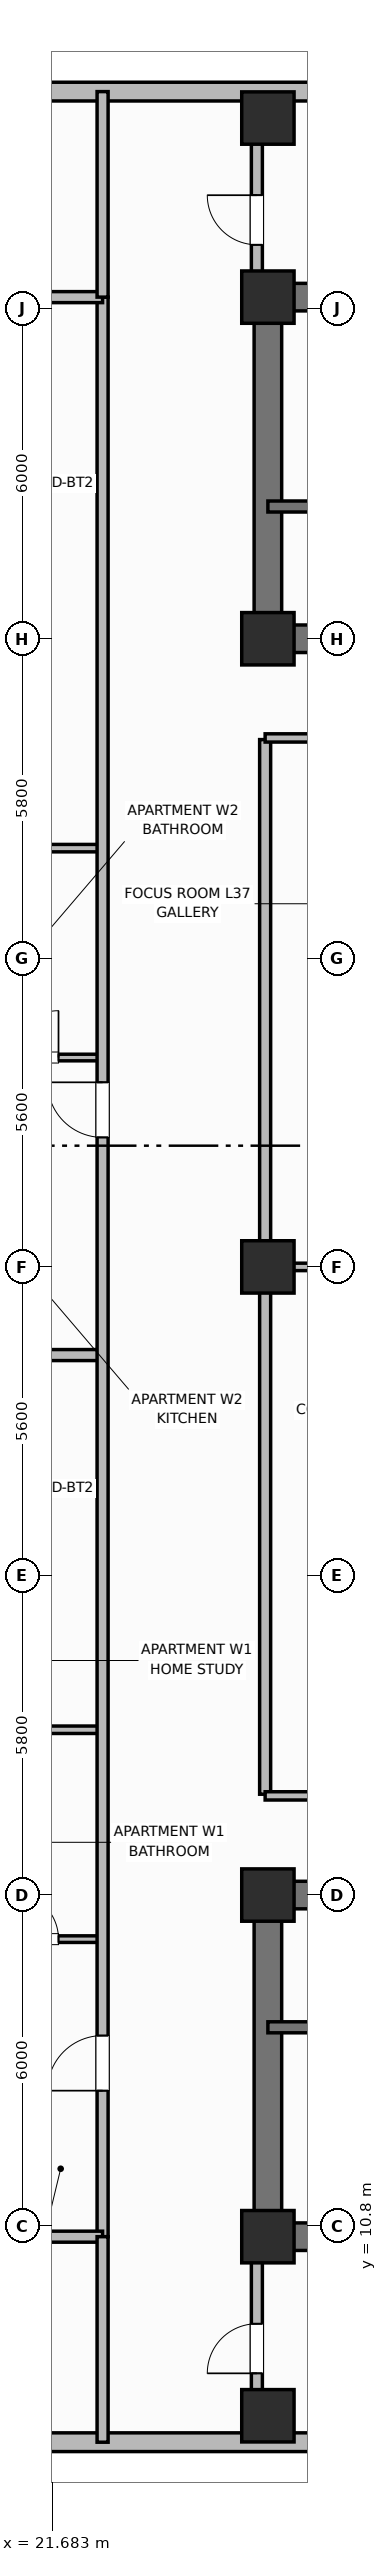
"""IFC4 building model, lengths in metres.
Left out: names, types, materials, properties, quantities, classifications, styles, units other than length and angle.
Written with IfcOpenShell. Run it as: python <this file> out.ifc"""

import sys

from ifc_helpers import new_model, si_unit, direction, frame, frame_2d, origin, origin_2d, place, context, subcontext, project, spatial, rectangle, extrude, element, fill, save


model = new_model("IFC4")
c1 = context("Model", 3, precision=1e-05, world=origin(), true_north=direction((0.0, 1.0)))
c2 = subcontext(c1, "Body", "Model", "MODEL_VIEW")
j1 = project(units=[si_unit("LENGTHUNIT", "METRE"), si_unit("PLANEANGLEUNIT", "RADIAN")], contexts=[c1])
p1 = place(None, origin())
s1 = spatial("IfcSite", under=j1, at=p1, CompositionType="ELEMENT")
p2 = place(p1, origin())
s2 = spatial("IfcBuilding", under=s1, at=p2, CompositionType="ELEMENT")
p3 = place(p2, frame((0.0, 0.0, 151.5)))
s3 = spatial("IfcBuildingStorey", under=s2, at=p3, CompositionType="ELEMENT", Elevation=151.5)
p4 = place(p3, frame((52.8, 10.6, 0.0), z_axis=(0.0, 0.0, 1.0), x_axis=(-1.0, 0.0, 0.0)))
e1 = element("IfcWall", 1, at=p4, inside=s3, PredefinedType="SHEAR", context=c2, shape_type="SweptSolid", body=[
    extrude(rectangle(XDim=27.2, YDim=0.5, at=frame_2d((13.6, 0.0))), origin(), (0.0, 0.0, 1.0), 3.7),
])
p5 = place(p3, frame((25.6, 10.85, 0.0), z_axis=(0.0, 0.0, 1.0), x_axis=(0.0, 1.0, 0.0)))
e2 = element("IfcWall", 2, at=p5, inside=s3, PredefinedType="SHEAR", context=c2, shape_type="SweptSolid", body=[
    extrude(rectangle(XDim=5.7, YDim=0.5, at=frame_2d((2.85, 0.0))), origin(), (0.0, 0.0, 1.0), 3.7),
])
p6 = place(p3, frame((25.6, 16.8, 0.0), z_axis=(0.0, 0.0, 1.0), x_axis=(1.0, 0.0, 0.0)))
e3 = element("IfcWall", 3, at=p6, inside=s3, PredefinedType="SHEAR", context=c2, shape_type="SweptSolid", body=[
    extrude(rectangle(XDim=27.2, YDim=0.5, at=frame_2d((13.6, 0.0))), origin(), (0.0, 0.0, 1.0), 3.7),
])
p7 = place(p6, frame((1.9, 0.0, 0.0)))
e4 = element("IfcOpeningElement", 4, at=p7, cuts=e3, PredefinedType="OPENING", context=c2, shape_type="SweptSolid", body=[
    extrude(rectangle(XDim=1.1, YDim=2.15, at=frame_2d((0.55, 1.075))), frame((0.0, 0.26, 0.0), z_axis=(0.0, -1.0, 0.0), x_axis=(1.0, 0.0, 0.0)), (0.0, 0.0, 1.0), 0.52),
])
p8 = place(p6, frame((13.0, 0.0, 0.0)))
e5 = element("IfcOpeningElement", 5, at=p8, cuts=e3, PredefinedType="OPENING", context=c2, shape_type="SweptSolid", body=[
    extrude(rectangle(XDim=1.2, YDim=2.15, at=frame_2d((0.6, 1.075))), frame((0.0, 0.26, 0.0), z_axis=(0.0, -1.0, 0.0), x_axis=(1.0, 0.0, 0.0)), (0.0, 0.0, 1.0), 0.52),
])
p9 = place(p6, frame((21.6, 0.0, 0.0)))
e6 = element("IfcOpeningElement", 6, at=p9, cuts=e3, PredefinedType="OPENING", context=c2, shape_type="SweptSolid", body=[
    extrude(rectangle(XDim=1.0, YDim=2.15, at=frame_2d((0.5, 1.075))), frame((0.0, 0.26, 0.0), z_axis=(0.0, -1.0, 0.0), x_axis=(1.0, 0.0, 0.0)), (0.0, 0.0, 1.0), 0.52),
])
p10 = place(p3, frame((25.6, 45.8, 0.0), z_axis=(0.0, 0.0, 1.0), x_axis=(1.0, 0.0, 0.0)))
e7 = element("IfcWall", 7, at=p10, inside=s3, PredefinedType="SHEAR", context=c2, shape_type="SweptSolid", body=[
    extrude(rectangle(XDim=27.2, YDim=0.5, at=frame_2d((13.6, 0.0))), origin(), (0.0, 0.0, 1.0), 3.7),
])
p11 = place(p3, frame((25.6, 39.85, 0.0), z_axis=(0.0, 0.0, 1.0), x_axis=(0.0, 1.0, 0.0)))
e8 = element("IfcWall", 8, at=p11, inside=s3, PredefinedType="SHEAR", context=c2, shape_type="SweptSolid", body=[
    extrude(rectangle(XDim=5.7, YDim=0.5, at=frame_2d((2.85, 0.0))), origin(), (0.0, 0.0, 1.0), 3.7),
])
p12 = place(p3, frame((52.8, 39.6, 0.0), z_axis=(0.0, 0.0, 1.0), x_axis=(-1.0, 0.0, 0.0)))
e9 = element("IfcWall", 9, at=p12, inside=s3, PredefinedType="SHEAR", context=c2, shape_type="SweptSolid", body=[
    extrude(rectangle(XDim=27.2, YDim=0.5, at=frame_2d((13.6, 0.0))), origin(), (0.0, 0.0, 1.0), 3.7),
])
p13 = place(p12, frame((24.2, 0.0, 0.0)))
e10 = element("IfcOpeningElement", 10, at=p13, cuts=e9, PredefinedType="OPENING", context=c2, shape_type="SweptSolid", body=[
    extrude(rectangle(XDim=1.1, YDim=2.15, at=frame_2d((0.55, 1.075))), frame((0.0, 0.26, 0.0), z_axis=(0.0, -1.0, 0.0), x_axis=(1.0, 0.0, 0.0)), (0.0, 0.0, 1.0), 0.52),
])
p14 = place(p12, frame((15.1, 0.0, 0.0)))
e11 = element("IfcOpeningElement", 11, at=p14, cuts=e9, PredefinedType="OPENING", context=c2, shape_type="SweptSolid", body=[
    extrude(rectangle(XDim=1.2, YDim=2.15, at=frame_2d((0.6, 1.075))), frame((0.0, 0.26, 0.0), z_axis=(0.0, -1.0, 0.0), x_axis=(1.0, 0.0, 0.0)), (0.0, 0.0, 1.0), 0.52),
])
p15 = place(p12, frame((11.6, 0.0, 0.0)))
e12 = element("IfcOpeningElement", 12, at=p15, cuts=e9, PredefinedType="OPENING", context=c2, shape_type="SweptSolid", body=[
    extrude(rectangle(XDim=0.9, YDim=2.1, at=frame_2d((0.45, 1.05))), frame((0.0, 0.26, 0.0), z_axis=(0.0, -1.0, 0.0), x_axis=(1.0, 0.0, 0.0)), (0.0, 0.0, 1.0), 0.52),
])
p16 = place(p12, frame((7.35, 0.0, 0.0)))
e13 = element("IfcOpeningElement", 13, at=p16, cuts=e9, PredefinedType="OPENING", context=c2, shape_type="SweptSolid", body=[
    extrude(rectangle(XDim=0.85, YDim=2.1, at=frame_2d((0.425, 1.05))), frame((0.0, 0.26, 0.0), z_axis=(0.0, -1.0, 0.0), x_axis=(1.0, 0.0, 0.0)), (0.0, 0.0, 1.0), 0.52),
])
p17 = place(p12, frame((3.6, 0.0, 0.0)))
e14 = element("IfcOpeningElement", 14, at=p17, cuts=e9, PredefinedType="OPENING", context=c2, shape_type="SweptSolid", body=[
    extrude(rectangle(XDim=1.0, YDim=2.15, at=frame_2d((0.5, 1.075))), frame((0.0, 0.26, 0.0), z_axis=(0.0, -1.0, 0.0), x_axis=(1.0, 0.0, 0.0)), (0.0, 0.0, 1.0), 0.52),
])
for number, where, z_axis, x_axis in (
    (15, (25.6, 10.6, 0.0), (0.0, 0.0, 1.0), (1.0, 0.0, 0.0)),
    (16, (25.6, 16.8, 0.0), (0.0, 0.0, 1.0), (1.0, 0.0, 0.0)),
    (17, (25.6, 39.6, 0.0), (0.0, 0.0, 1.0), (1.0, 0.0, 0.0)),
    (18, (25.6, 45.8, 0.0), (0.0, 0.0, 1.0), (1.0, 0.0, 0.0)),
    (19, (25.6, 28.2, 0.0), (0.0, 0.0, 1.0), (1.0, 0.0, 0.0)),
    (20, (25.6, 7.35, 0.0), (0.0, 0.0, 1.0), (1.0, 0.0, 0.0)),
    (21, (25.6, 49.05, 0.0), (0.0, 0.0, 1.0), (1.0, 0.0, 0.0)),
):
    element("IfcColumn", number, at=place(p3, frame(where, z_axis=z_axis, x_axis=x_axis)), inside=s3, PredefinedType="COLUMN", context=c2, shape_type="SweptSolid", body=[
        extrude(rectangle(XDim=0.95, YDim=0.95, at=origin_2d()), origin(), (0.0, 0.0, 1.0), 3.7),
    ])
p18 = place(p3, frame((20.2, 6.87, 0.0), z_axis=(0.0, 0.0, 1.0), x_axis=(1.0, 0.0, 0.0)))
e22 = element("IfcWall", 22, at=p18, inside=s3, PredefinedType="SOLIDWALL", context=c2, shape_type="SweptSolid", body=[
    extrude(rectangle(XDim=15.8, YDim=0.34, at=frame_2d((7.9, 0.0))), origin(), (0.0, 0.0, 1.0), 2.72),
])
p19 = place(p18, frame((7.2, 0.0, 0.75)))
e23 = element("IfcOpeningElement", 23, at=p19, cuts=e22, PredefinedType="OPENING", context=c2, shape_type="SweptSolid", body=[
    extrude(rectangle(XDim=1.4, YDim=1.85, at=frame_2d((0.7, 0.925))), frame((0.0, 0.18, 0.0), z_axis=(0.0, -1.0, 0.0), x_axis=(1.0, 0.0, 0.0)), (0.0, 0.0, 1.0), 0.36),
])
p20 = place(p18, frame((9.4, 0.0, 0.75)))
e24 = element("IfcOpeningElement", 24, at=p20, cuts=e22, PredefinedType="OPENING", context=c2, shape_type="SweptSolid", body=[
    extrude(rectangle(XDim=1.4, YDim=1.85, at=frame_2d((0.7, 0.925))), frame((0.0, 0.18, 0.0), z_axis=(0.0, -1.0, 0.0), x_axis=(1.0, 0.0, 0.0)), (0.0, 0.0, 1.0), 0.36),
])
p21 = place(p18, frame((12.3, 0.0, 0.75)))
e25 = element("IfcOpeningElement", 25, at=p21, cuts=e22, PredefinedType="OPENING", context=c2, shape_type="SweptSolid", body=[
    extrude(rectangle(XDim=1.4, YDim=1.85, at=frame_2d((0.7, 0.925))), frame((0.0, 0.18, 0.0), z_axis=(0.0, -1.0, 0.0), x_axis=(1.0, 0.0, 0.0)), (0.0, 0.0, 1.0), 0.36),
])
p22 = place(p3, frame((36.0, 49.53, 0.0), z_axis=(0.0, 0.0, 1.0), x_axis=(-1.0, 0.0, 0.0)))
e26 = element("IfcWall", 26, at=p22, inside=s3, PredefinedType="SOLIDWALL", context=c2, shape_type="SweptSolid", body=[
    extrude(rectangle(XDim=15.8, YDim=0.34, at=frame_2d((7.9, 0.0))), origin(), (0.0, 0.0, 1.0), 2.72),
])
p23 = place(p22, frame((5.188, 0.0, 0.75)))
e27 = element("IfcOpeningElement", 27, at=p23, cuts=e26, PredefinedType="OPENING", context=c2, shape_type="SweptSolid", body=[
    extrude(rectangle(XDim=1.8, YDim=1.85, at=frame_2d((0.9, 0.925))), frame((0.0, 0.18, 0.0), z_axis=(0.0, -1.0, 0.0), x_axis=(1.0, 0.0, 0.0)), (0.0, 0.0, 1.0), 0.36),
])
p24 = place(p3, frame((25.6, 14.4, 0.0), z_axis=(0.0, 0.0, 1.0), x_axis=(1.0, 0.0, 0.0)))
e28 = element("IfcWall", 28, at=p24, inside=s3, PredefinedType="SHEAR", context=c2, shape_type="SweptSolid", body=[
    extrude(rectangle(XDim=9.55, YDim=0.2, at=frame_2d((4.775, 0.0))), origin(), (0.0, 0.0, 1.0), 3.7),
])
p25 = place(p24, frame((1.05, 0.0, 0.0)))
e29 = element("IfcOpeningElement", 29, at=p25, cuts=e28, PredefinedType="OPENING", context=c2, shape_type="SweptSolid", body=[
    extrude(rectangle(XDim=1.1, YDim=2.15, at=frame_2d((0.55, 1.075))), frame((0.0, 0.11, 0.0), z_axis=(0.0, -1.0, 0.0), x_axis=(1.0, 0.0, 0.0)), (0.0, 0.0, 1.0), 0.22),
])
p26 = place(p3, frame((35.15, 42.0, 0.0), z_axis=(0.0, 0.0, 1.0), x_axis=(-1.0, 0.0, 0.0)))
e30 = element("IfcWall", 30, at=p26, inside=s3, PredefinedType="SHEAR", context=c2, shape_type="SweptSolid", body=[
    extrude(rectangle(XDim=9.55, YDim=0.2, at=frame_2d((4.775, 0.0))), origin(), (0.0, 0.0, 1.0), 3.7),
])
p27 = place(p26, frame((7.25, 0.0, 0.0)))
e31 = element("IfcOpeningElement", 31, at=p27, cuts=e30, PredefinedType="OPENING", context=c2, shape_type="SweptSolid", body=[
    extrude(rectangle(XDim=1.1, YDim=2.15, at=frame_2d((0.55, 1.075))), frame((0.0, 0.11, 0.0), z_axis=(0.0, -1.0, 0.0), x_axis=(1.0, 0.0, 0.0)), (0.0, 0.0, 1.0), 0.22),
])
p28 = place(p3, frame((25.55, 18.63, 0.0), z_axis=(0.0, 0.0, 1.0), x_axis=(0.0, 1.0, 0.0)))
e32 = element("IfcWall", 32, at=p28, inside=s3, PredefinedType="PARTITIONING", context=c2, shape_type="SweptSolid", body=[
    extrude(rectangle(XDim=19.14, YDim=0.2, at=frame_2d((9.57, 0.0))), origin(), (0.0, 0.0, 1.0), 2.55),
])
for number, where, z_axis, x_axis in (
    (33, (25.55, 18.6, 0.0), (0.0, 0.0, 1.0), (1.0, 0.0, 0.0)),
    (34, (25.55, 37.8, 0.0), (0.0, 0.0, 1.0), (1.0, 0.0, 0.0)),
):
    element("IfcWall", number, at=place(p3, frame(where, z_axis=z_axis, x_axis=x_axis)), inside=s3, PredefinedType="PARTITIONING", context=c2, shape_type="SweptSolid", body=[
        extrude(rectangle(XDim=2.7, YDim=0.15, at=frame_2d((1.35, 0.0))), origin(), (0.0, 0.0, 1.0), 2.55),
    ])
p29 = place(p3, frame((25.6, 28.2, 0.0), z_axis=(0.0, 0.0, 1.0), x_axis=(1.0, 0.0, 0.0)))
e35 = element("IfcWall", 35, at=p29, inside=s3, PredefinedType="PARTITIONING", context=c2, shape_type="SweptSolid", body=[
    extrude(rectangle(XDim=2.66, YDim=0.135, at=frame_2d((1.33, 0.0))), origin(), (0.0, 0.0, 1.0), 2.55),
])
p30 = place(p3, frame((20.35, 16.0, 0.0), z_axis=(0.0, 0.0, 1.0), x_axis=(1.0, 0.0, 0.0)))
e36 = element("IfcWall", 36, at=p30, inside=s3, PredefinedType="PARTITIONING", context=c2, shape_type="SweptSolid", body=[
    extrude(rectangle(XDim=2.25, YDim=0.12, at=frame_2d((1.125, 0.0))), origin(), (0.0, 0.0, 1.0), 2.55),
])
p31 = place(p30, frame((0.6, 0.0, 0.0)))
e37 = element("IfcOpeningElement", 37, at=p31, cuts=e36, PredefinedType="OPENING", context=c2, shape_type="SweptSolid", body=[
    extrude(rectangle(XDim=0.85, YDim=2.1, at=frame_2d((0.425, 1.05))), frame((0.0, 0.07, 0.0), z_axis=(0.0, -1.0, 0.0), x_axis=(1.0, 0.0, 0.0)), (0.0, 0.0, 1.0), 0.14),
])
p32 = place(p3, frame((20.35, 19.8, 0.0), z_axis=(0.0, 0.0, 1.0), x_axis=(1.0, 0.0, 0.0)))
e38 = element("IfcWall", 38, at=p32, inside=s3, PredefinedType="PARTITIONING", context=c2, shape_type="SweptSolid", body=[
    extrude(rectangle(XDim=2.25, YDim=0.135, at=frame_2d((1.125, 0.0))), origin(), (0.0, 0.0, 1.0), 2.55),
])
p33 = place(p3, frame((16.884, 26.6, 0.0), z_axis=(0.0, 0.0, 1.0), x_axis=(1.0, 0.0, 0.0)))
e39 = element("IfcWall", 39, at=p33, inside=s3, PredefinedType="PARTITIONING", context=c2, shape_type="SweptSolid", body=[
    extrude(rectangle(XDim=5.716, YDim=0.2, at=frame_2d((2.858, 0.0))), origin(), (0.0, 0.0, 1.0), 2.55),
])
p34 = place(p3, frame((20.35, 32.0, 0.0), z_axis=(0.0, 0.0, 1.0), x_axis=(1.0, 0.0, 0.0)))
e40 = element("IfcWall", 40, at=p34, inside=s3, PredefinedType="PARTITIONING", context=c2, shape_type="SweptSolid", body=[
    extrude(rectangle(XDim=2.25, YDim=0.12, at=frame_2d((1.125, 0.0))), origin(), (0.0, 0.0, 1.0), 2.55),
])
p35 = place(p34, frame((0.6, 0.0, 0.0)))
e41 = element("IfcOpeningElement", 41, at=p35, cuts=e40, PredefinedType="OPENING", context=c2, shape_type="SweptSolid", body=[
    extrude(rectangle(XDim=0.85, YDim=2.1, at=frame_2d((0.425, 1.05))), frame((0.0, 0.07, 0.0), z_axis=(0.0, -1.0, 0.0), x_axis=(1.0, 0.0, 0.0)), (0.0, 0.0, 1.0), 0.14),
])
p36 = place(p3, frame((20.35, 35.8, 0.0), z_axis=(0.0, 0.0, 1.0), x_axis=(1.0, 0.0, 0.0)))
e42 = element("IfcWall", 42, at=p36, inside=s3, PredefinedType="PARTITIONING", context=c2, shape_type="SweptSolid", body=[
    extrude(rectangle(XDim=2.25, YDim=0.135, at=frame_2d((1.125, 0.0))), origin(), (0.0, 0.0, 1.0), 2.55),
])
p37 = place(p3, frame((22.6, 10.6, 0.0), z_axis=(0.0, 0.0, 1.0), x_axis=(0.0, 1.0, 0.0)))
e43 = element("IfcWall", 43, at=p37, inside=s3, PredefinedType="PARTITIONING", context=c2, shape_type="SweptSolid", body=[
    extrude(rectangle(XDim=35.2, YDim=0.2, at=frame_2d((17.6, 0.0))), origin(), (0.0, 0.0, 1.0), 2.55),
])
p38 = place(p37, frame((2.65, 0.0, 0.0)))
e44 = element("IfcOpeningElement", 44, at=p38, cuts=e43, PredefinedType="OPENING", context=c2, shape_type="SweptSolid", body=[
    extrude(rectangle(XDim=1.0, YDim=2.15, at=frame_2d((0.5, 1.075))), frame((0.0, 0.11, 0.0), z_axis=(0.0, -1.0, 0.0), x_axis=(1.0, 0.0, 0.0)), (0.0, 0.0, 1.0), 0.22),
])
p39 = place(p37, frame((19.95, 0.0, 0.0)))
e45 = element("IfcOpeningElement", 45, at=p39, cuts=e43, PredefinedType="OPENING", context=c2, shape_type="SweptSolid", body=[
    extrude(rectangle(XDim=1.0, YDim=2.15, at=frame_2d((0.5, 1.075))), frame((0.0, 0.11, 0.0), z_axis=(0.0, -1.0, 0.0), x_axis=(1.0, 0.0, 0.0)), (0.0, 0.0, 1.0), 0.22),
])
for number, where, z_axis, x_axis in (
    (46, (16.99, 10.6, 0.0), (0.0, 0.0, 1.0), (1.0, 0.0, 0.0)),
    (47, (16.99, 45.8, 0.0), (0.0, 0.0, 1.0), (1.0, 0.0, 0.0)),
):
    element("IfcWall", number, at=place(p3, frame(where, z_axis=z_axis, x_axis=x_axis)), inside=s3, PredefinedType="PARTITIONING", context=c2, shape_type="SweptSolid", body=[
        extrude(rectangle(XDim=5.61, YDim=0.2, at=frame_2d((2.805, 0.0))), origin(), (0.0, 0.0, 1.0), 2.55),
    ])
for number, where, z_axis, x_axis in (
    (48, (22.6, 6.87, 0.0), (0.0, 0.0, 1.0), (0.0, 1.0, 0.0)),
    (49, (22.6, 45.8, 0.0), (0.0, 0.0, 1.0), (0.0, 1.0, 0.0)),
):
    element("IfcWall", number, at=place(p3, frame(where, z_axis=z_axis, x_axis=x_axis)), inside=s3, PredefinedType="PARTITIONING", context=c2, shape_type="SweptSolid", body=[
        extrude(rectangle(XDim=3.73, YDim=0.2, at=frame_2d((1.865, 0.0))), origin(), (0.0, 0.0, 1.0), 2.55),
    ])
p40 = place(p3, frame((25.4, 7.47, 0.0), z_axis=(0.0, 0.0, 1.0), x_axis=(0.0, 1.0, 0.0)))
e50 = element("IfcWall", 50, at=p40, inside=s3, PredefinedType="PARTITIONING", context=c2, shape_type="SweptSolid", body=[
    extrude(rectangle(XDim=2.83, YDim=0.2, at=frame_2d((1.415, 0.0))), origin(), (0.0, 0.0, 1.0), 2.55),
])
p41 = place(p40, frame((0.65, 0.0, 0.0)))
e51 = element("IfcOpeningElement", 51, at=p41, cuts=e50, PredefinedType="OPENING", context=c2, shape_type="SweptSolid", body=[
    extrude(rectangle(XDim=0.9, YDim=2.1, at=frame_2d((0.45, 1.05))), frame((0.0, 0.11, 0.0), z_axis=(0.0, -1.0, 0.0), x_axis=(1.0, 0.0, 0.0)), (0.0, 0.0, 1.0), 0.22),
])
p42 = place(p3, frame((25.4, 46.1, 0.0), z_axis=(0.0, 0.0, 1.0), x_axis=(0.0, 1.0, 0.0)))
e52 = element("IfcWall", 52, at=p42, inside=s3, PredefinedType="PARTITIONING", context=c2, shape_type="SweptSolid", body=[
    extrude(rectangle(XDim=2.83, YDim=0.2, at=frame_2d((1.415, 0.0))), origin(), (0.0, 0.0, 1.0), 2.55),
])
p43 = place(p42, frame((0.65, 0.0, 0.0)))
e53 = element("IfcOpeningElement", 53, at=p43, cuts=e52, PredefinedType="OPENING", context=c2, shape_type="SweptSolid", body=[
    extrude(rectangle(XDim=0.9, YDim=2.1, at=frame_2d((0.45, 1.05))), frame((0.0, 0.11, 0.0), z_axis=(0.0, -1.0, 0.0), x_axis=(1.0, 0.0, 0.0)), (0.0, 0.0, 1.0), 0.22),
])
p44 = place(p31, origin())
e54 = element("IfcDoor", 54, at=p44, inside=s3, OperationType="SINGLE_SWING_LEFT", PredefinedType="DOOR", context=c2, shape_type="SweptSolid", body=[
    extrude(rectangle(XDim=0.85, YDim=2.1, at=frame_2d((0.425, 1.05))), frame((0.0, 0.025, 0.0), z_axis=(0.0, -1.0, 0.0), x_axis=(1.0, 0.0, 0.0)), (0.0, 0.0, 1.0), 0.05),
])
fill(e37, e54)
p45 = place(p35, origin())
e55 = element("IfcDoor", 55, at=p45, inside=s3, OperationType="SINGLE_SWING_RIGHT", PredefinedType="DOOR", context=c2, shape_type="SweptSolid", body=[
    extrude(rectangle(XDim=0.85, YDim=2.1, at=frame_2d((0.425, 1.05))), frame((0.0, 0.025, 0.0), z_axis=(0.0, -1.0, 0.0), x_axis=(1.0, 0.0, 0.0)), (0.0, 0.0, 1.0), 0.05),
])
fill(e41, e55)
p46 = place(p38, origin())
e56 = element("IfcDoor", 56, at=p46, inside=s3, OperationType="SINGLE_SWING_LEFT", PredefinedType="DOOR", context=c2, shape_type="SweptSolid", body=[
    extrude(rectangle(XDim=1.0, YDim=2.15, at=frame_2d((0.5, 1.075))), frame((0.0, 0.025, 0.0), z_axis=(0.0, -1.0, 0.0), x_axis=(1.0, 0.0, 0.0)), (0.0, 0.0, 1.0), 0.05),
])
fill(e44, e56)
p47 = place(p39, origin())
e57 = element("IfcDoor", 57, at=p47, inside=s3, OperationType="SINGLE_SWING_RIGHT", PredefinedType="DOOR", context=c2, shape_type="SweptSolid", body=[
    extrude(rectangle(XDim=1.0, YDim=2.15, at=frame_2d((0.5, 1.075))), frame((0.0, 0.025, 0.0), z_axis=(0.0, -1.0, 0.0), x_axis=(1.0, 0.0, 0.0)), (0.0, 0.0, 1.0), 0.05),
])
fill(e45, e57)
p48 = place(p41, origin())
e58 = element("IfcDoor", 58, at=p48, inside=s3, OperationType="SINGLE_SWING_LEFT", PredefinedType="DOOR", context=c2, shape_type="SweptSolid", body=[
    extrude(rectangle(XDim=0.9, YDim=2.1, at=frame_2d((0.45, 1.05))), frame((0.0, 0.025, 0.0), z_axis=(0.0, -1.0, 0.0), x_axis=(1.0, 0.0, 0.0)), (0.0, 0.0, 1.0), 0.05),
])
fill(e51, e58)
p49 = place(p43, origin())
e59 = element("IfcDoor", 59, at=p49, inside=s3, OperationType="SINGLE_SWING_RIGHT", PredefinedType="DOOR", context=c2, shape_type="SweptSolid", body=[
    extrude(rectangle(XDim=0.9, YDim=2.1, at=frame_2d((0.45, 1.05))), frame((0.0, 0.025, 0.0), z_axis=(0.0, -1.0, 0.0), x_axis=(1.0, 0.0, 0.0)), (0.0, 0.0, 1.0), 0.05),
])
fill(e53, e59)
save(model, sys.argv[1])
